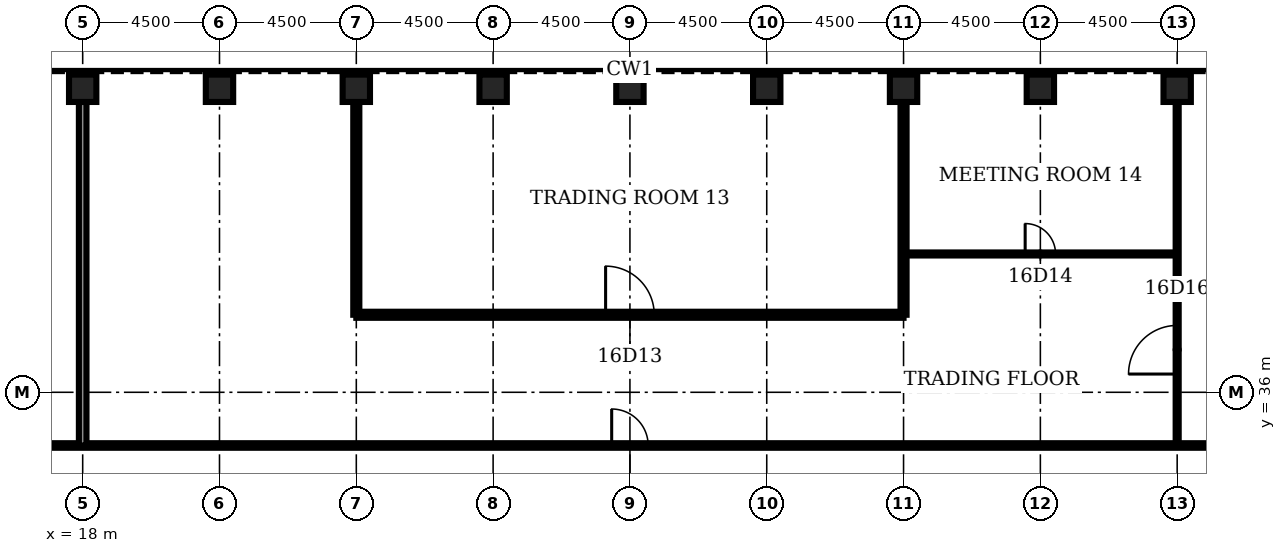
"""IFC4 building model, lengths in metres.
Left out: names, types, materials, properties, quantities, classifications, styles, units other than length and angle.
Written with IfcOpenShell. Run it as: python <this file> out.ifc"""

import sys

from ifc_helpers import new_model, si_unit, direction, frame, frame_2d, origin, origin_2d, place, context, subcontext, project, spatial, rectangle, hollow_rectangle, extrude, element, fill, save


model = new_model("IFC4")
c1 = context("Model", 3, precision=1e-05, world=origin(), true_north=direction((0.0, 1.0)))
c2 = subcontext(c1, "Body", "Model", "MODEL_VIEW")
j1 = project(units=[si_unit("LENGTHUNIT", "METRE"), si_unit("PLANEANGLEUNIT", "RADIAN")], contexts=[c1])
p1 = place(None, origin())
s1 = spatial("IfcSite", under=j1, at=p1, CompositionType="ELEMENT")
p2 = place(p1, origin())
s2 = spatial("IfcBuilding", under=s1, at=p2, CompositionType="ELEMENT")
p3 = place(p2, frame((0.0, 0.0, 77.0)))
s3 = spatial("IfcBuildingStorey", under=s2, at=p3, CompositionType="ELEMENT", Elevation=77.0)
for number, where, z_axis, x_axis in (
    (1, (54.0, 46.0, 0.0), (0.0, 0.0, 1.0), (0.0, 1.0, 0.0)),
    (2, (49.5, 46.0, 0.0), (0.0, 0.0, 1.0), (0.0, 1.0, 0.0)),
    (3, (45.0, 46.0, 0.0), (0.0, 0.0, 1.0), (0.0, 1.0, 0.0)),
    (4, (40.5, 46.0, 0.0), (0.0, 0.0, 1.0), (0.0, 1.0, 0.0)),
    (5, (36.0, 46.0, 0.0), (0.0, 0.0, 1.0), (0.0, 1.0, 0.0)),
    (6, (31.5, 46.0, 0.0), (0.0, 0.0, 1.0), (0.0, 1.0, 0.0)),
    (7, (27.0, 46.0, 0.0), (0.0, 0.0, 1.0), (0.0, 1.0, 0.0)),
    (8, (22.5, 46.0, 0.0), (0.0, 0.0, 1.0), (0.0, 1.0, 0.0)),
    (9, (18.0, 46.0, 0.0), (0.0, 0.0, 1.0), (0.0, 1.0, 0.0)),
):
    element("IfcColumn", number, at=place(p3, frame(where, z_axis=z_axis, x_axis=x_axis)), inside=s3, PredefinedType="COLUMN", context=c2, shape_type="SweptSolid", body=[
        extrude(hollow_rectangle(XDim=0.9, YDim=0.9, WallThickness=0.11, at=origin_2d()), origin(), (0.0, 0.0, 1.0), 4.5),
    ])
p4 = place(p3, frame((15.15, 34.25, 0.0), z_axis=(0.0, 0.0, 1.0), x_axis=(1.0, 0.0, 0.0)))
e10 = element("IfcWall", 10, at=p4, inside=s3, PredefinedType="PARTITIONING", context=c2, shape_type="SweptSolid", body=[
    extrude(rectangle(XDim=41.7, YDim=0.15, at=frame_2d((20.85, 0.0))), origin(), (0.0, 0.0, 1.0), 3.0),
])
p5 = place(p4, frame((20.25, 0.0, 0.0)))
e11 = element("IfcOpeningElement", 11, at=p5, cuts=e10, PredefinedType="OPENING", context=c2, shape_type="SweptSolid", body=[
    extrude(rectangle(XDim=1.2, YDim=2.1, at=frame_2d((0.6, 1.05))), frame((0.0, 0.085, 0.0), z_axis=(0.0, -1.0, 0.0), x_axis=(1.0, 0.0, 0.0)), (0.0, 0.0, 1.0), 0.17),
])
p6 = place(p3, frame((27.0, 38.55, 0.0), z_axis=(0.0, 0.0, 1.0), x_axis=(1.0, 0.0, 0.0)))
e12 = element("IfcWall", 12, at=p6, inside=s3, PredefinedType="PARTITIONING", context=c2, shape_type="SweptSolid", body=[
    extrude(rectangle(XDim=18.0, YDim=0.2, at=frame_2d((9.0, 0.0))), origin(), (0.0, 0.0, 1.0), 3.0),
])
p7 = place(p6, frame((8.2, 0.0, 0.0)))
e13 = element("IfcOpeningElement", 13, at=p7, cuts=e12, PredefinedType="OPENING", context=c2, shape_type="SweptSolid", body=[
    extrude(rectangle(XDim=1.6, YDim=2.1, at=frame_2d((0.8, 1.05))), frame((0.0, 0.11, 0.0), z_axis=(0.0, -1.0, 0.0), x_axis=(1.0, 0.0, 0.0)), (0.0, 0.0, 1.0), 0.22),
])
p8 = place(p3, frame((45.0, 40.55, 0.0), z_axis=(0.0, 0.0, 1.0), x_axis=(1.0, 0.0, 0.0)))
e14 = element("IfcWall", 14, at=p8, inside=s3, PredefinedType="PARTITIONING", context=c2, shape_type="SweptSolid", body=[
    extrude(rectangle(XDim=9.0, YDim=0.1, at=frame_2d((4.5, 0.0))), origin(), (0.0, 0.0, 1.0), 3.0),
])
p9 = place(p8, frame((4.0, 0.0, 0.0)))
e15 = element("IfcOpeningElement", 15, at=p9, cuts=e14, PredefinedType="OPENING", context=c2, shape_type="SweptSolid", body=[
    extrude(rectangle(XDim=1.0, YDim=2.1, at=frame_2d((0.5, 1.05))), frame((0.0, 0.06, 0.0), z_axis=(0.0, -1.0, 0.0), x_axis=(1.0, 0.0, 0.0)), (0.0, 0.0, 1.0), 0.12),
])
p10 = place(p3, frame((18.0, 34.25, 0.0), z_axis=(0.0, 0.0, 1.0), x_axis=(0.0, 1.0, 0.0)))
e16 = element("IfcWall", 16, at=p10, inside=s3, PredefinedType="PARTITIONING", context=c2, shape_type="SweptSolid", body=[
    extrude(rectangle(XDim=11.3, YDim=0.25, at=frame_2d((5.65, 0.0))), origin(), (0.0, 0.0, 1.0), 3.0),
])
for number, where, z_axis, x_axis in (
    (17, (27.0, 38.55, 0.0), (0.0, 0.0, 1.0), (0.0, 1.0, 0.0)),
    (18, (45.0, 38.55, 0.0), (0.0, 0.0, 1.0), (0.0, 1.0, 0.0)),
):
    element("IfcWall", number, at=place(p3, frame(where, z_axis=z_axis, x_axis=x_axis)), inside=s3, PredefinedType="PARTITIONING", context=c2, shape_type="SweptSolid", body=[
        extrude(rectangle(XDim=7.0, YDim=0.2, at=frame_2d((3.5, 0.0))), origin(), (0.0, 0.0, 1.0), 3.0),
    ])
p11 = place(p3, frame((54.0, 34.25, 0.0), z_axis=(0.0, 0.0, 1.0), x_axis=(0.0, 1.0, 0.0)))
e19 = element("IfcWall", 19, at=p11, inside=s3, PredefinedType="PARTITIONING", context=c2, shape_type="SweptSolid", body=[
    extrude(rectangle(XDim=11.3, YDim=0.1, at=frame_2d((5.65, 0.0))), origin(), (0.0, 0.0, 1.0), 3.0),
])
p12 = place(p11, frame((2.35, 0.0, 0.0)))
e20 = element("IfcOpeningElement", 20, at=p12, cuts=e19, PredefinedType="OPENING", context=c2, shape_type="SweptSolid", body=[
    extrude(rectangle(XDim=1.6, YDim=2.1, at=frame_2d((0.8, 1.05))), frame((0.0, 0.06, 0.0), z_axis=(0.0, -1.0, 0.0), x_axis=(1.0, 0.0, 0.0)), (0.0, 0.0, 1.0), 0.12),
])
p13 = place(p7, origin())
e21 = element("IfcDoor", 21, at=p13, inside=s3, OperationType="SINGLE_SWING_LEFT", PredefinedType="DOOR", context=c2, shape_type="SweptSolid", body=[
    extrude(rectangle(XDim=1.6, YDim=2.1, at=frame_2d((0.8, 1.05))), frame((0.0, 0.025, 0.0), z_axis=(0.0, -1.0, 0.0), x_axis=(1.0, 0.0, 0.0)), (0.0, 0.0, 1.0), 0.05),
])
fill(e13, e21)
p14 = place(p9, origin())
e22 = element("IfcDoor", 22, at=p14, inside=s3, OperationType="SINGLE_SWING_LEFT", PredefinedType="DOOR", context=c2, shape_type="SweptSolid", body=[
    extrude(rectangle(XDim=1.0, YDim=2.1, at=frame_2d((0.5, 1.05))), frame((0.0, 0.025, 0.0), z_axis=(0.0, -1.0, 0.0), x_axis=(1.0, 0.0, 0.0)), (0.0, 0.0, 1.0), 0.05),
])
fill(e15, e22)
p15 = place(p12, origin())
e23 = element("IfcDoor", 23, at=p15, inside=s3, OperationType="SINGLE_SWING_LEFT", PredefinedType="DOOR", context=c2, shape_type="SweptSolid", body=[
    extrude(rectangle(XDim=1.6, YDim=2.1, at=frame_2d((0.8, 1.05))), frame((0.0, 0.025, 0.0), z_axis=(0.0, -1.0, 0.0), x_axis=(1.0, 0.0, 0.0)), (0.0, 0.0, 1.0), 0.05),
])
fill(e20, e23)
p16 = place(p5, origin())
e24 = element("IfcDoor", 24, at=p16, inside=s3, OperationType="SINGLE_SWING_LEFT", PredefinedType="DOOR", context=c2, shape_type="SweptSolid", body=[
    extrude(rectangle(XDim=1.2, YDim=2.1, at=frame_2d((0.6, 1.05))), frame((0.0, 0.025, 0.0), z_axis=(0.0, -1.0, 0.0), x_axis=(1.0, 0.0, 0.0)), (0.0, 0.0, 1.0), 0.05),
])
fill(e11, e24)
save(model, sys.argv[1])
